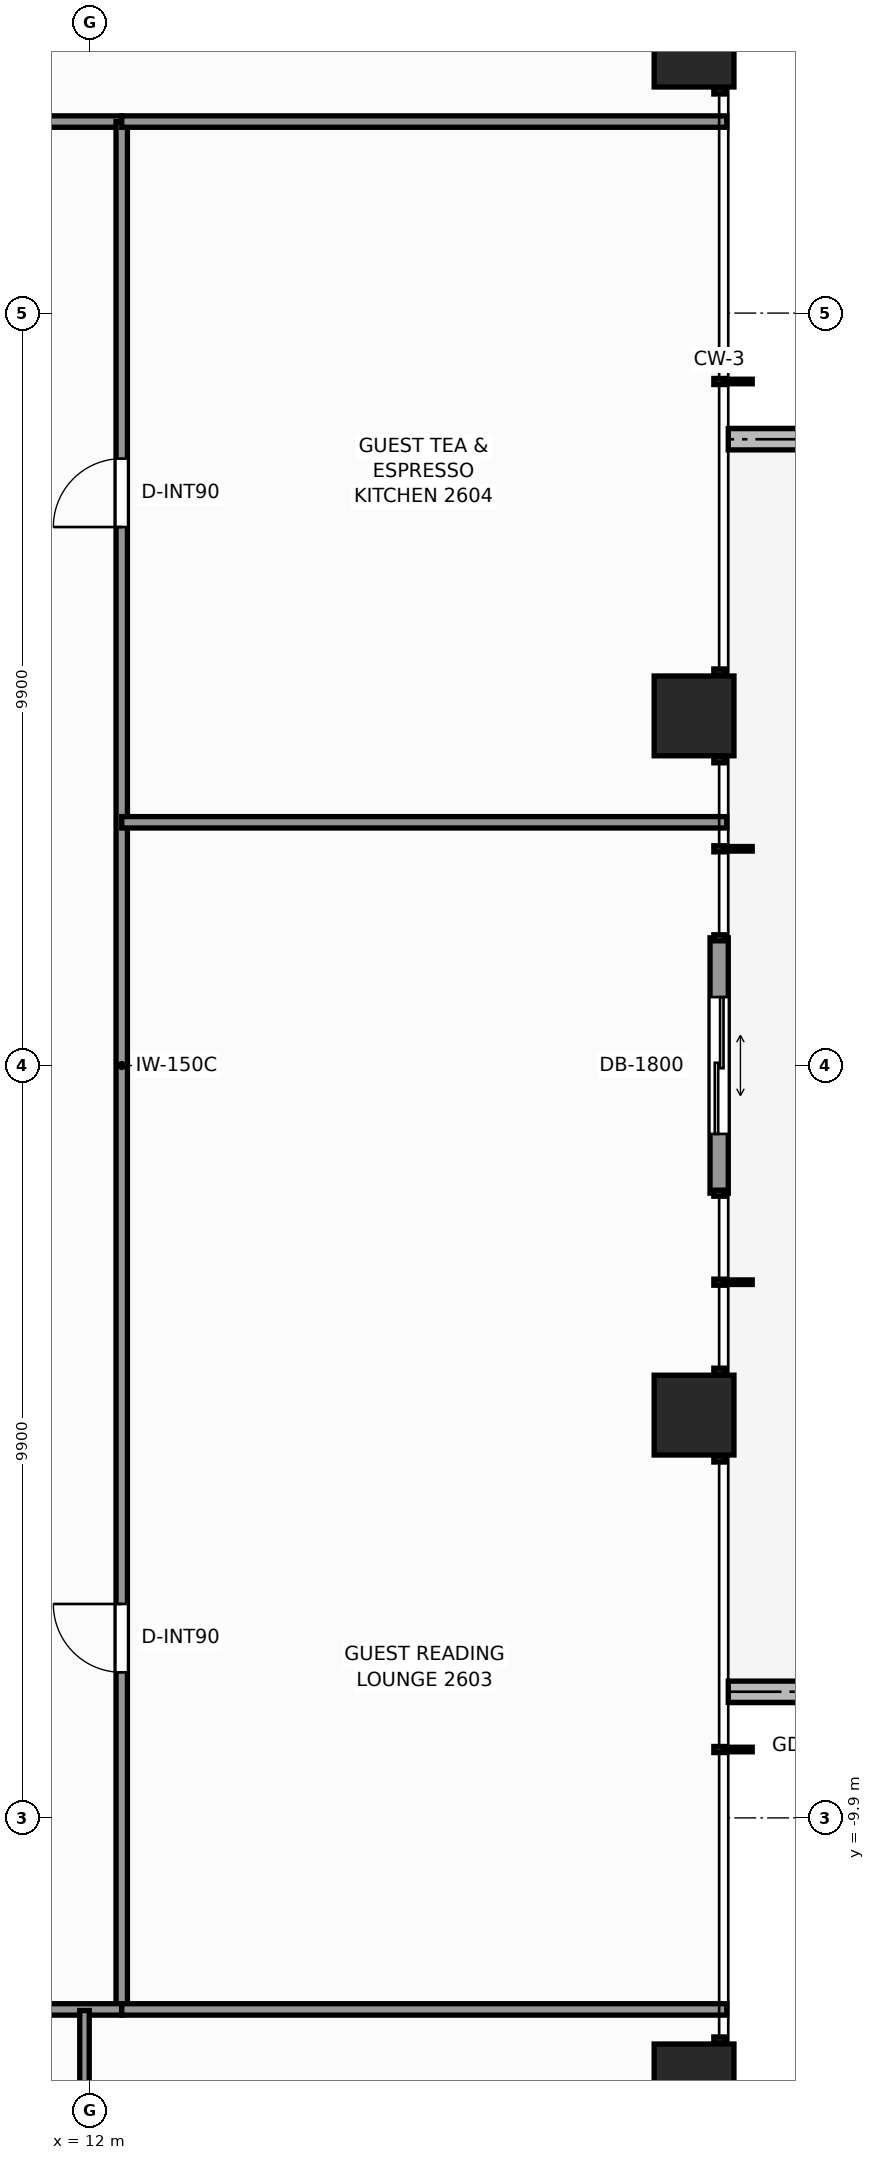
"""IFC4 building model, lengths in metres.
Left out: names, types, materials, properties, quantities, classifications, styles, units other than length and angle.
Written with IfcOpenShell. Run it as: python <this file> out.ifc"""

import sys

from ifc_helpers import new_model, si_unit, direction, frame, frame_2d, origin, origin_2d, place, context, subcontext, project, spatial, rectangle, extrude, element, fill, save


model = new_model("IFC4")
c1 = context("Model", 3, precision=1e-05, world=origin(), true_north=direction((0.0, 1.0)))
c2 = subcontext(c1, "Body", "Model", "MODEL_VIEW")
j1 = project(units=[si_unit("LENGTHUNIT", "METRE"), si_unit("PLANEANGLEUNIT", "RADIAN")], contexts=[c1])
p1 = place(None, origin())
s1 = spatial("IfcSite", under=j1, at=p1, CompositionType="ELEMENT")
p2 = place(p1, origin())
s2 = spatial("IfcBuilding", under=s1, at=p2, CompositionType="ELEMENT")
p3 = place(p2, frame((0.0, 0.0, 92.0)))
s3 = spatial("IfcBuildingStorey", under=s2, at=p3, CompositionType="ELEMENT", Elevation=92.0)
for number, where, z_axis, x_axis in (
    (1, (19.95, -13.4, 0.0), (0.0, 0.0, 1.0), (1.0, 0.0, 0.0)),
    (2, (19.95, -4.6, 0.0), (0.0, 0.0, 1.0), (1.0, 0.0, 0.0)),
    (3, (19.95, 4.6, 0.0), (0.0, 0.0, 1.0), (1.0, 0.0, 0.0)),
    (4, (19.95, 13.4, 0.0), (0.0, 0.0, 1.0), (1.0, 0.0, 0.0)),
):
    element("IfcColumn", number, at=place(p3, frame(where, z_axis=z_axis, x_axis=x_axis)), inside=s3, PredefinedType="COLUMN", context=c2, shape_type="SweptSolid", body=[
        extrude(rectangle(XDim=1.05, YDim=1.05, at=origin_2d()), origin(), (0.0, 0.0, 1.0), 3.3),
    ])
p4 = place(p3, frame((23.767, 8.24, -0.04), z_axis=(0.0, 0.0, 1.0), x_axis=(-1.0, 0.0, 0.0)))
e5 = element("IfcWall", 5, at=p4, inside=s3, PredefinedType="PARAPET", context=c2, shape_type="SweptSolid", body=[
    extrude(rectangle(XDim=3.367, YDim=0.28, at=frame_2d((1.684, 0.0))), origin(), (0.0, 0.0, 1.0), 0.42),
])
p5 = place(p3, frame((20.4, -8.24, -0.04), z_axis=(0.0, 0.0, 1.0), x_axis=(1.0, 0.0, 0.0)))
e6 = element("IfcWall", 6, at=p5, inside=s3, PredefinedType="PARAPET", context=c2, shape_type="SweptSolid", body=[
    extrude(rectangle(XDim=2.34, YDim=0.28, at=frame_2d((1.17, 0.0))), origin(), (0.0, 0.0, 1.0), 0.42),
])
p6 = place(p3, frame((20.28, 1.68, 0.0), z_axis=(0.0, 0.0, 1.0), x_axis=(0.0, -1.0, 0.0)))
e7 = element("IfcWall", 7, at=p6, inside=s3, PredefinedType="STANDARD", context=c2, shape_type="SweptSolid", body=[
    extrude(rectangle(XDim=3.36, YDim=0.24, at=frame_2d((1.68, 0.0))), origin(), (0.0, 0.0, 1.0), 3.08),
])
p7 = place(p6, frame((0.78, 0.0, 0.0)))
e8 = element("IfcOpeningElement", 8, at=p7, cuts=e7, PredefinedType="OPENING", context=c2, shape_type="SweptSolid", body=[
    extrude(rectangle(XDim=1.8, YDim=2.2, at=frame_2d((0.9, 1.1))), frame((0.0, 0.13, 0.0), z_axis=(0.0, -1.0, 0.0), x_axis=(1.0, 0.0, 0.0)), (0.0, 0.0, 1.0), 0.26),
])
p8 = place(p3, frame((-12.26, 12.42, 0.0), z_axis=(0.0, 0.0, 1.0), x_axis=(1.0, 0.0, 0.0)))
e9 = element("IfcWall", 9, at=p8, inside=s3, PredefinedType="PARTITIONING", context=c2, shape_type="SweptSolid", body=[
    extrude(rectangle(XDim=24.68, YDim=0.15, at=frame_2d((12.34, 0.0))), origin(), (0.0, 0.0, 1.0), 2.292),
])
p9 = place(p8, frame((4.275, 0.0, 0.0)))
e10 = element("IfcOpeningElement", 10, at=p9, cuts=e9, PredefinedType="OPENING", context=c2, shape_type="SweptSolid", body=[
    extrude(rectangle(XDim=0.9, YDim=2.06, at=frame_2d((0.45, 1.03))), frame((0.0, 0.085, 0.0), z_axis=(0.0, -1.0, 0.0), x_axis=(1.0, 0.0, 0.0)), (0.0, 0.0, 1.0), 0.17),
])
p10 = place(p8, frame((19.345, 0.0, 0.0)))
e11 = element("IfcOpeningElement", 11, at=p10, cuts=e9, PredefinedType="OPENING", context=c2, shape_type="SweptSolid", body=[
    extrude(rectangle(XDim=0.9, YDim=2.06, at=frame_2d((0.45, 1.03))), frame((0.0, 0.085, 0.0), z_axis=(0.0, -1.0, 0.0), x_axis=(1.0, 0.0, 0.0)), (0.0, 0.0, 1.0), 0.17),
])
p11 = place(p3, frame((12.42, -12.42, 0.0), z_axis=(0.0, 0.0, 1.0), x_axis=(0.0, 1.0, 0.0)))
e12 = element("IfcWall", 12, at=p11, inside=s3, PredefinedType="PARTITIONING", context=c2, shape_type="SweptSolid", body=[
    extrude(rectangle(XDim=24.84, YDim=0.15, at=frame_2d((12.42, 0.0))), origin(), (0.0, 0.0, 1.0), 2.292),
])
p12 = place(p11, frame((4.435, 0.0, 0.0)))
e13 = element("IfcOpeningElement", 13, at=p12, cuts=e12, PredefinedType="OPENING", context=c2, shape_type="SweptSolid", body=[
    extrude(rectangle(XDim=0.9, YDim=2.06, at=frame_2d((0.45, 1.03))), frame((0.0, 0.085, 0.0), z_axis=(0.0, -1.0, 0.0), x_axis=(1.0, 0.0, 0.0)), (0.0, 0.0, 1.0), 0.17),
])
p13 = place(p11, frame((19.505, 0.0, 0.0)))
e14 = element("IfcOpeningElement", 14, at=p13, cuts=e12, PredefinedType="OPENING", context=c2, shape_type="SweptSolid", body=[
    extrude(rectangle(XDim=0.9, YDim=2.06, at=frame_2d((0.45, 1.03))), frame((0.0, 0.085, 0.0), z_axis=(0.0, -1.0, 0.0), x_axis=(1.0, 0.0, 0.0)), (0.0, 0.0, 1.0), 0.17),
])
p14 = place(p3, frame((-3.65, -12.42, 0.0), z_axis=(0.0, 0.0, 1.0), x_axis=(1.0, 0.0, 0.0)))
e15 = element("IfcWall", 15, at=p14, inside=s3, PredefinedType="PARTITIONING", context=c2, shape_type="SweptSolid", body=[
    extrude(rectangle(XDim=16.07, YDim=0.15, at=frame_2d((8.035, 0.0))), origin(), (0.0, 0.0, 1.0), 2.292),
])
p15 = place(p14, frame((0.889, 0.0, 0.0)))
e16 = element("IfcOpeningElement", 16, at=p15, cuts=e15, PredefinedType="OPENING", context=c2, shape_type="SweptSolid", body=[
    extrude(rectangle(XDim=0.9, YDim=2.06, at=frame_2d((0.45, 1.03))), frame((0.0, 0.085, 0.0), z_axis=(0.0, -1.0, 0.0), x_axis=(1.0, 0.0, 0.0)), (0.0, 0.0, 1.0), 0.17),
])
p16 = place(p14, frame((4.722, 0.0, 0.0)))
e17 = element("IfcOpeningElement", 17, at=p16, cuts=e15, PredefinedType="OPENING", context=c2, shape_type="SweptSolid", body=[
    extrude(rectangle(XDim=0.95, YDim=2.06, at=frame_2d((0.475, 1.03))), frame((0.0, 0.085, 0.0), z_axis=(0.0, -1.0, 0.0), x_axis=(1.0, 0.0, 0.0)), (0.0, 0.0, 1.0), 0.17),
])
p17 = place(p14, frame((9.415, 0.0, 0.0)))
e18 = element("IfcOpeningElement", 18, at=p17, cuts=e15, PredefinedType="OPENING", context=c2, shape_type="SweptSolid", body=[
    extrude(rectangle(XDim=0.9, YDim=2.06, at=frame_2d((0.45, 1.03))), frame((0.0, 0.085, 0.0), z_axis=(0.0, -1.0, 0.0), x_axis=(1.0, 0.0, 0.0)), (0.0, 0.0, 1.0), 0.17),
])
p18 = place(p14, frame((11.313, 0.0, 0.0)))
e19 = element("IfcOpeningElement", 19, at=p18, cuts=e15, PredefinedType="OPENING", context=c2, shape_type="SweptSolid", body=[
    extrude(rectangle(XDim=0.95, YDim=2.06, at=frame_2d((0.475, 1.03))), frame((0.0, 0.085, 0.0), z_axis=(0.0, -1.0, 0.0), x_axis=(1.0, 0.0, 0.0)), (0.0, 0.0, 1.0), 0.17),
])
for number, where, z_axis, x_axis in (
    (20, (12.42, -12.42, 0.0), (0.0, 0.0, 1.0), (1.0, 0.0, 0.0)),
    (21, (12.42, 12.42, 0.0), (0.0, 0.0, 1.0), (1.0, 0.0, 0.0)),
):
    element("IfcWall", number, at=place(p3, frame(where, z_axis=z_axis, x_axis=x_axis)), inside=s3, PredefinedType="PARTITIONING", context=c2, shape_type="SweptSolid", body=[
        extrude(rectangle(XDim=7.96, YDim=0.15, at=frame_2d((3.98, 0.0))), origin(), (0.0, 0.0, 1.0), 2.292),
    ])
p19 = place(p3, frame((12.42, 3.2, 0.0), z_axis=(0.0, 0.0, 1.0), x_axis=(1.0, 0.0, 0.0)))
e22 = element("IfcWall", 22, at=p19, inside=s3, PredefinedType="PARTITIONING", context=c2, shape_type="SweptSolid", body=[
    extrude(rectangle(XDim=7.96, YDim=0.15, at=frame_2d((3.98, 0.0))), origin(), (0.0, 0.0, 1.0), 2.369),
])
p20 = place(p3, frame((11.93, -15.075, 0.0), z_axis=(0.0, 0.0, 1.0), x_axis=(0.0, 1.0, 0.0)))
e23 = element("IfcWall", 23, at=p20, inside=s3, PredefinedType="PARTITIONING", context=c2, shape_type="SweptSolid", body=[
    extrude(rectangle(XDim=2.64, YDim=0.125, at=frame_2d((1.32, 0.0))), origin(), (0.0, 0.0, 1.0), 2.292),
])
p21 = place(p7, origin())
e24 = element("IfcDoor", 24, at=p21, inside=s3, OperationType="DOUBLE_DOOR_SLIDING", PredefinedType="DOOR", context=c2, shape_type="SweptSolid", body=[
    extrude(rectangle(XDim=1.8, YDim=2.2, at=frame_2d((0.9, 1.1))), frame((0.0, 0.025, 0.0), z_axis=(0.0, -1.0, 0.0), x_axis=(1.0, 0.0, 0.0)), (0.0, 0.0, 1.0), 0.05),
])
fill(e8, e24)
p22 = place(p12, origin())
e25 = element("IfcDoor", 25, at=p22, inside=s3, OperationType="SINGLE_SWING_RIGHT", PredefinedType="DOOR", context=c2, shape_type="SweptSolid", body=[
    extrude(rectangle(XDim=0.9, YDim=2.06, at=frame_2d((0.45, 1.03))), frame((0.0, 0.025, 0.0), z_axis=(0.0, -1.0, 0.0), x_axis=(1.0, 0.0, 0.0)), (0.0, 0.0, 1.0), 0.05),
])
fill(e13, e25)
p23 = place(p13, origin())
e26 = element("IfcDoor", 26, at=p23, inside=s3, OperationType="SINGLE_SWING_LEFT", PredefinedType="DOOR", context=c2, shape_type="SweptSolid", body=[
    extrude(rectangle(XDim=0.9, YDim=2.06, at=frame_2d((0.45, 1.03))), frame((0.0, 0.025, 0.0), z_axis=(0.0, -1.0, 0.0), x_axis=(1.0, 0.0, 0.0)), (0.0, 0.0, 1.0), 0.05),
])
fill(e14, e26)
save(model, sys.argv[1])
